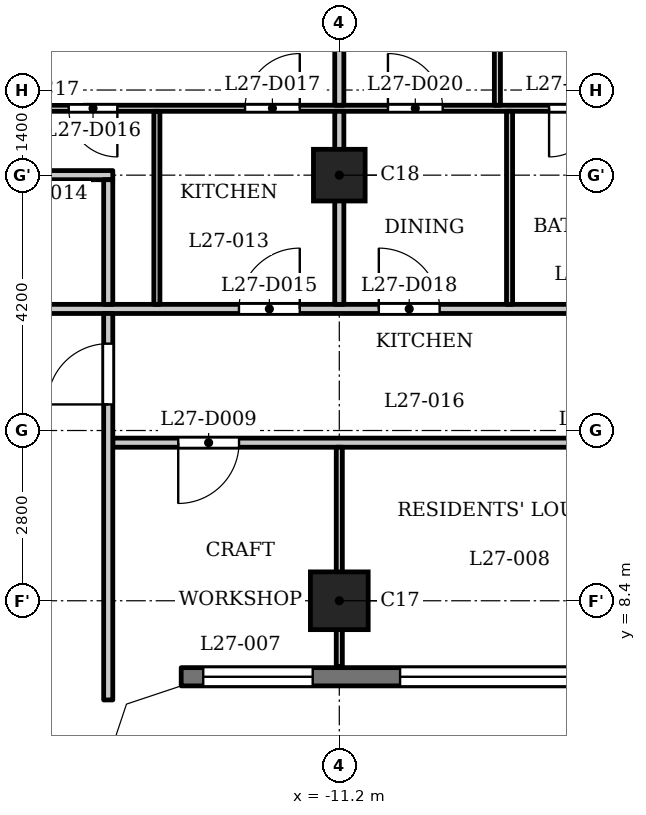
"""IFC4 building model, lengths in metres.
Left out: names, types, materials, properties, quantities, classifications, styles, units other than length and angle.
Written with IfcOpenShell. Run it as: python <this file> out.ifc"""

import sys

from ifc_helpers import new_model, si_unit, direction, frame, frame_2d, origin, origin_2d, place, context, subcontext, project, spatial, polyline, rectangle, outline, extrude, element, fill, save


model = new_model("IFC4")
c1 = context("Model", 3, precision=1e-05, world=origin(), true_north=direction((0.0, 1.0)))
c2 = subcontext(c1, "Body", "Model", "MODEL_VIEW")
j1 = project(units=[si_unit("LENGTHUNIT", "METRE"), si_unit("PLANEANGLEUNIT", "RADIAN")], contexts=[c1])
p1 = place(None, origin())
s1 = spatial("IfcSite", under=j1, at=p1, CompositionType="ELEMENT")
p2 = place(p1, origin())
s2 = spatial("IfcBuilding", under=s1, at=p2, CompositionType="ELEMENT")
p3 = place(p2, frame((0.0, 0.0, 107.8)))
s3 = spatial("IfcBuildingStorey", under=s2, at=p3, CompositionType="ELEMENT", Elevation=107.8)
p4 = place(p3, frame((-11.2, 8.4, 0.0), z_axis=(0.0, 0.0, 1.0), x_axis=(1.0, 0.0, 0.0)))
e1 = element("IfcColumn", 1, at=p4, inside=s3, PredefinedType="COLUMN", context=c2, shape_type="SweptSolid", body=[
    extrude(rectangle(XDim=0.95, YDim=0.95, at=origin_2d()), origin(), (0.0, 0.0, 1.0), 3.5),
])
p5 = place(p3, frame((-11.2, 15.4, 0.0), z_axis=(0.0, 0.0, 1.0), x_axis=(1.0, 0.0, 0.0)))
e2 = element("IfcColumn", 2, at=p5, inside=s3, PredefinedType="COLUMN", context=c2, shape_type="SweptSolid", body=[
    extrude(rectangle(XDim=0.85, YDim=0.85, at=origin_2d()), origin(), (0.0, 0.0, 1.0), 3.5),
])
p6 = place(p3, frame((-13.8, 7.15, 0.0), z_axis=(0.0, 0.0, 1.0), x_axis=(1.0, 0.0, 0.0)))
e3 = element("IfcWall", 3, at=p6, inside=s3, PredefinedType="SOLIDWALL", context=c2, shape_type="SweptSolid", body=[
    extrude(rectangle(XDim=27.6, YDim=0.3, at=frame_2d((13.8, 0.0))), origin(), (0.0, 0.0, 1.0), 3.2),
])
p7 = place(p6, frame((0.363, 0.0, 0.9)))
e4 = element("IfcOpeningElement", 4, at=p7, cuts=e3, PredefinedType="OPENING", context=c2, shape_type="SweptSolid", body=[
    extrude(rectangle(XDim=1.8, YDim=1.25, at=frame_2d((0.9, 0.625))), frame((0.0, 0.16, 0.0), z_axis=(0.0, -1.0, 0.0), x_axis=(1.0, 0.0, 0.0)), (0.0, 0.0, 1.0), 0.32),
])
p8 = place(p6, frame((3.6, 0.0, 1.2)))
e5 = element("IfcOpeningElement", 5, at=p8, cuts=e3, PredefinedType="OPENING", context=c2, shape_type="SweptSolid", body=[
    extrude(rectangle(XDim=3.6, YDim=0.95, at=frame_2d((1.8, 0.475))), frame((0.0, 0.16, 0.0), z_axis=(0.0, -1.0, 0.0), x_axis=(1.0, 0.0, 0.0)), (0.0, 0.0, 1.0), 0.32),
])
p9 = place(p6, frame((9.2, 0.0, 1.2)))
e6 = element("IfcOpeningElement", 6, at=p9, cuts=e3, PredefinedType="OPENING", context=c2, shape_type="SweptSolid", body=[
    extrude(rectangle(XDim=3.6, YDim=0.95, at=frame_2d((1.8, 0.475))), frame((0.0, 0.16, 0.0), z_axis=(0.0, -1.0, 0.0), x_axis=(1.0, 0.0, 0.0)), (0.0, 0.0, 1.0), 0.32),
])
p10 = place(p6, frame((14.8, 0.0, 1.2)))
e7 = element("IfcOpeningElement", 7, at=p10, cuts=e3, PredefinedType="OPENING", context=c2, shape_type="SweptSolid", body=[
    extrude(rectangle(XDim=3.6, YDim=0.95, at=frame_2d((1.8, 0.475))), frame((0.0, 0.16, 0.0), z_axis=(0.0, -1.0, 0.0), x_axis=(1.0, 0.0, 0.0)), (0.0, 0.0, 1.0), 0.32),
])
p11 = place(p6, frame((20.4, 0.0, 1.2)))
e8 = element("IfcOpeningElement", 8, at=p11, cuts=e3, PredefinedType="OPENING", context=c2, shape_type="SweptSolid", body=[
    extrude(rectangle(XDim=3.6, YDim=0.95, at=frame_2d((1.8, 0.475))), frame((0.0, 0.16, 0.0), z_axis=(0.0, -1.0, 0.0), x_axis=(1.0, 0.0, 0.0)), (0.0, 0.0, 1.0), 0.32),
])
p12 = place(p6, frame((25.438, 0.0, 0.9)))
e9 = element("IfcOpeningElement", 9, at=p12, cuts=e3, PredefinedType="OPENING", context=c2, shape_type="SweptSolid", body=[
    extrude(rectangle(XDim=1.8, YDim=1.25, at=frame_2d((0.9, 0.625))), frame((0.0, 0.16, 0.0), z_axis=(0.0, -1.0, 0.0), x_axis=(1.0, 0.0, 0.0)), (0.0, 0.0, 1.0), 0.32),
])
p13 = place(p3, frame((-14.925, 11.0, 0.0), z_axis=(0.0, 0.0, 1.0), x_axis=(1.0, 0.0, 0.0)))
e10 = element("IfcWall", 10, at=p13, inside=s3, PredefinedType="PARTITIONING", context=c2, shape_type="SweptSolid", body=[
    extrude(rectangle(XDim=29.85, YDim=0.15, at=frame_2d((14.925, 0.0))), origin(), (0.0, 0.0, 1.0), 3.2),
])
p14 = place(p13, frame((1.076, 0.0, 0.0)))
e11 = element("IfcOpeningElement", 11, at=p14, cuts=e10, PredefinedType="OPENING", context=c2, shape_type="SweptSolid", body=[
    extrude(rectangle(XDim=1.0, YDim=2.1, at=frame_2d((0.5, 1.05))), frame((0.0, 0.085, 0.0), z_axis=(0.0, -1.0, 0.0), x_axis=(1.0, 0.0, 0.0)), (0.0, 0.0, 1.0), 0.17),
])
p15 = place(p13, frame((7.625, 0.0, 0.0)))
e12 = element("IfcOpeningElement", 12, at=p15, cuts=e10, PredefinedType="OPENING", context=c2, shape_type="SweptSolid", body=[
    extrude(rectangle(XDim=1.0, YDim=2.1, at=frame_2d((0.5, 1.05))), frame((0.0, 0.085, 0.0), z_axis=(0.0, -1.0, 0.0), x_axis=(1.0, 0.0, 0.0)), (0.0, 0.0, 1.0), 0.17),
])
p16 = place(p13, frame((9.975, 0.0, 0.0)))
e13 = element("IfcOpeningElement", 13, at=p16, cuts=e10, PredefinedType="OPENING", context=c2, shape_type="SweptSolid", body=[
    extrude(rectangle(XDim=1.0, YDim=2.1, at=frame_2d((0.5, 1.05))), frame((0.0, 0.085, 0.0), z_axis=(0.0, -1.0, 0.0), x_axis=(1.0, 0.0, 0.0)), (0.0, 0.0, 1.0), 0.17),
])
p17 = place(p13, frame((18.825, 0.0, 0.0)))
e14 = element("IfcOpeningElement", 14, at=p17, cuts=e10, PredefinedType="OPENING", context=c2, shape_type="SweptSolid", body=[
    extrude(rectangle(XDim=1.0, YDim=2.1, at=frame_2d((0.5, 1.05))), frame((0.0, 0.085, 0.0), z_axis=(0.0, -1.0, 0.0), x_axis=(1.0, 0.0, 0.0)), (0.0, 0.0, 1.0), 0.17),
])
p18 = place(p13, frame((21.175, 0.0, 0.0)))
e15 = element("IfcOpeningElement", 15, at=p18, cuts=e10, PredefinedType="OPENING", context=c2, shape_type="SweptSolid", body=[
    extrude(rectangle(XDim=1.0, YDim=2.1, at=frame_2d((0.5, 1.05))), frame((0.0, 0.085, 0.0), z_axis=(0.0, -1.0, 0.0), x_axis=(1.0, 0.0, 0.0)), (0.0, 0.0, 1.0), 0.17),
])
p19 = place(p13, frame((27.775, 0.0, 0.0)))
e16 = element("IfcOpeningElement", 16, at=p19, cuts=e10, PredefinedType="OPENING", context=c2, shape_type="SweptSolid", body=[
    extrude(rectangle(XDim=1.0, YDim=2.1, at=frame_2d((0.5, 1.05))), frame((0.0, 0.085, 0.0), z_axis=(0.0, -1.0, 0.0), x_axis=(1.0, 0.0, 0.0)), (0.0, 0.0, 1.0), 0.17),
])
p20 = place(p3, frame((-17.4, 13.2, 0.0), z_axis=(0.0, 0.0, 1.0), x_axis=(1.0, 0.0, 0.0)))
e17 = element("IfcWall", 17, at=p20, inside=s3, PredefinedType="PARTITIONING", context=c2, shape_type="SweptSolid", body=[
    extrude(rectangle(XDim=34.8, YDim=0.15, at=frame_2d((17.4, 0.0))), origin(), (0.0, 0.0, 1.0), 3.2),
])
p21 = place(p20, frame((0.25, 0.0, 0.0)))
e18 = element("IfcOpeningElement", 18, at=p21, cuts=e17, PredefinedType="OPENING", context=c2, shape_type="SweptSolid", body=[
    extrude(rectangle(XDim=1.0, YDim=2.1, at=frame_2d((0.5, 1.05))), frame((0.0, 0.085, 0.0), z_axis=(0.0, -1.0, 0.0), x_axis=(1.0, 0.0, 0.0)), (0.0, 0.0, 1.0), 0.17),
])
p22 = place(p20, frame((33.65, 0.0, 0.0)))
e19 = element("IfcOpeningElement", 19, at=p22, cuts=e17, PredefinedType="OPENING", context=c2, shape_type="SweptSolid", body=[
    extrude(rectangle(XDim=1.0, YDim=2.1, at=frame_2d((0.5, 1.05))), frame((0.0, 0.085, 0.0), z_axis=(0.0, -1.0, 0.0), x_axis=(1.0, 0.0, 0.0)), (0.0, 0.0, 1.0), 0.17),
])
p23 = place(p20, frame((4.55, 0.0, 0.0)))
e20 = element("IfcOpeningElement", 20, at=p23, cuts=e17, PredefinedType="OPENING", context=c2, shape_type="SweptSolid", body=[
    extrude(rectangle(XDim=1.0, YDim=2.1, at=frame_2d((0.5, 1.05))), frame((0.0, 0.085, 0.0), z_axis=(0.0, -1.0, 0.0), x_axis=(1.0, 0.0, 0.0)), (0.0, 0.0, 1.0), 0.17),
])
p24 = place(p20, frame((6.85, 0.0, 0.0)))
e21 = element("IfcOpeningElement", 21, at=p24, cuts=e17, PredefinedType="OPENING", context=c2, shape_type="SweptSolid", body=[
    extrude(rectangle(XDim=1.0, YDim=2.1, at=frame_2d((0.5, 1.05))), frame((0.0, 0.085, 0.0), z_axis=(0.0, -1.0, 0.0), x_axis=(1.0, 0.0, 0.0)), (0.0, 0.0, 1.0), 0.17),
])
p25 = place(p20, frame((12.5, 0.0, 0.0)))
e22 = element("IfcOpeningElement", 22, at=p25, cuts=e17, PredefinedType="OPENING", context=c2, shape_type="SweptSolid", body=[
    extrude(rectangle(XDim=1.0, YDim=2.1, at=frame_2d((0.5, 1.05))), frame((0.0, 0.085, 0.0), z_axis=(0.0, -1.0, 0.0), x_axis=(1.0, 0.0, 0.0)), (0.0, 0.0, 1.0), 0.17),
])
p26 = place(p20, frame((25.7, 0.0, 0.0)))
e23 = element("IfcOpeningElement", 23, at=p26, cuts=e17, PredefinedType="OPENING", context=c2, shape_type="SweptSolid", body=[
    extrude(rectangle(XDim=1.0, YDim=2.1, at=frame_2d((0.5, 1.05))), frame((0.0, 0.085, 0.0), z_axis=(0.0, -1.0, 0.0), x_axis=(1.0, 0.0, 0.0)), (0.0, 0.0, 1.0), 0.17),
])
p27 = place(p20, frame((29.75, 0.0, 0.0)))
e24 = element("IfcOpeningElement", 24, at=p27, cuts=e17, PredefinedType="OPENING", context=c2, shape_type="SweptSolid", body=[
    extrude(rectangle(XDim=1.0, YDim=2.1, at=frame_2d((0.5, 1.05))), frame((0.0, 0.085, 0.0), z_axis=(0.0, -1.0, 0.0), x_axis=(1.0, 0.0, 0.0)), (0.0, 0.0, 1.0), 0.17),
])
p28 = place(p3, frame((-27.484, 15.4, 0.0), z_axis=(0.0, 0.0, 1.0), x_axis=(1.0, 0.0, 0.0)))
e25 = element("IfcWall", 25, at=p28, inside=s3, PredefinedType="PARTITIONING", context=c2, shape_type="SweptSolid", body=[
    extrude(rectangle(XDim=12.559, YDim=0.15, at=frame_2d((6.279, 0.0))), origin(), (0.0, 0.0, 1.0), 3.2),
])
p29 = place(p28, frame((9.034, 0.0, 0.0)))
e26 = element("IfcOpeningElement", 26, at=p29, cuts=e25, PredefinedType="OPENING", context=c2, shape_type="SweptSolid", body=[
    extrude(rectangle(XDim=1.0, YDim=2.1, at=frame_2d((0.5, 1.05))), frame((0.0, 0.085, 0.0), z_axis=(0.0, -1.0, 0.0), x_axis=(1.0, 0.0, 0.0)), (0.0, 0.0, 1.0), 0.17),
])
p30 = place(p3, frame((-16.725, 16.5, 0.0), z_axis=(0.0, 0.0, 1.0), x_axis=(1.0, 0.0, 0.0)))
e27 = element("IfcWall", 27, at=p30, inside=s3, PredefinedType="PARTITIONING", context=c2, shape_type="SweptSolid", body=[
    extrude(rectangle(XDim=33.45, YDim=0.1, at=frame_2d((16.725, 0.0))), origin(), (0.0, 0.0, 1.0), 3.2),
])
p31 = place(p30, frame((1.075, 0.0, 0.0)))
e28 = element("IfcOpeningElement", 28, at=p31, cuts=e27, PredefinedType="OPENING", context=c2, shape_type="SweptSolid", body=[
    extrude(rectangle(XDim=0.8, YDim=2.1, at=frame_2d((0.4, 1.05))), frame((0.0, 0.06, 0.0), z_axis=(0.0, -1.0, 0.0), x_axis=(1.0, 0.0, 0.0)), (0.0, 0.0, 1.0), 0.12),
])
p32 = place(p30, frame((3.975, 0.0, 0.0)))
e29 = element("IfcOpeningElement", 29, at=p32, cuts=e27, PredefinedType="OPENING", context=c2, shape_type="SweptSolid", body=[
    extrude(rectangle(XDim=0.9, YDim=2.1, at=frame_2d((0.45, 1.05))), frame((0.0, 0.06, 0.0), z_axis=(0.0, -1.0, 0.0), x_axis=(1.0, 0.0, 0.0)), (0.0, 0.0, 1.0), 0.12),
])
p33 = place(p30, frame((8.975, 0.0, 0.0)))
e30 = element("IfcOpeningElement", 30, at=p33, cuts=e27, PredefinedType="OPENING", context=c2, shape_type="SweptSolid", body=[
    extrude(rectangle(XDim=0.8, YDim=2.1, at=frame_2d((0.4, 1.05))), frame((0.0, 0.06, 0.0), z_axis=(0.0, -1.0, 0.0), x_axis=(1.0, 0.0, 0.0)), (0.0, 0.0, 1.0), 0.12),
])
p34 = place(p30, frame((6.325, 0.0, 0.0)))
e31 = element("IfcOpeningElement", 31, at=p34, cuts=e27, PredefinedType="OPENING", context=c2, shape_type="SweptSolid", body=[
    extrude(rectangle(XDim=0.9, YDim=2.1, at=frame_2d((0.45, 1.05))), frame((0.0, 0.06, 0.0), z_axis=(0.0, -1.0, 0.0), x_axis=(1.0, 0.0, 0.0)), (0.0, 0.0, 1.0), 0.12),
])
p35 = place(p30, frame((20.725, 0.0, 0.0)))
e32 = element("IfcOpeningElement", 32, at=p35, cuts=e27, PredefinedType="OPENING", context=c2, shape_type="SweptSolid", body=[
    extrude(rectangle(XDim=0.8, YDim=2.1, at=frame_2d((0.4, 1.05))), frame((0.0, 0.06, 0.0), z_axis=(0.0, -1.0, 0.0), x_axis=(1.0, 0.0, 0.0)), (0.0, 0.0, 1.0), 0.12),
])
p36 = place(p30, frame((17.775, 0.0, 0.0)))
e33 = element("IfcOpeningElement", 33, at=p36, cuts=e27, PredefinedType="OPENING", context=c2, shape_type="SweptSolid", body=[
    extrude(rectangle(XDim=0.9, YDim=2.1, at=frame_2d((0.45, 1.05))), frame((0.0, 0.06, 0.0), z_axis=(0.0, -1.0, 0.0), x_axis=(1.0, 0.0, 0.0)), (0.0, 0.0, 1.0), 0.12),
])
p37 = place(p30, frame((11.825, 0.0, 0.0)))
e34 = element("IfcOpeningElement", 34, at=p37, cuts=e27, PredefinedType="OPENING", context=c2, shape_type="SweptSolid", body=[
    extrude(rectangle(XDim=0.9, YDim=2.1, at=frame_2d((0.45, 1.05))), frame((0.0, 0.06, 0.0), z_axis=(0.0, -1.0, 0.0), x_axis=(1.0, 0.0, 0.0)), (0.0, 0.0, 1.0), 0.12),
])
p38 = place(p30, frame((15.175, 0.0, 0.0)))
e35 = element("IfcOpeningElement", 35, at=p38, cuts=e27, PredefinedType="OPENING", context=c2, shape_type="SweptSolid", body=[
    extrude(rectangle(XDim=0.9, YDim=2.1, at=frame_2d((0.45, 1.05))), frame((0.0, 0.06, 0.0), z_axis=(0.0, -1.0, 0.0), x_axis=(1.0, 0.0, 0.0)), (0.0, 0.0, 1.0), 0.12),
])
p39 = place(p30, frame((22.975, 0.0, 0.0)))
e36 = element("IfcOpeningElement", 36, at=p39, cuts=e27, PredefinedType="OPENING", context=c2, shape_type="SweptSolid", body=[
    extrude(rectangle(XDim=0.8, YDim=2.1, at=frame_2d((0.4, 1.05))), frame((0.0, 0.06, 0.0), z_axis=(0.0, -1.0, 0.0), x_axis=(1.0, 0.0, 0.0)), (0.0, 0.0, 1.0), 0.12),
])
p40 = place(p30, frame((24.875, 0.0, 0.0)))
e37 = element("IfcOpeningElement", 37, at=p40, cuts=e27, PredefinedType="OPENING", context=c2, shape_type="SweptSolid", body=[
    extrude(rectangle(XDim=0.9, YDim=2.1, at=frame_2d((0.45, 1.05))), frame((0.0, 0.06, 0.0), z_axis=(0.0, -1.0, 0.0), x_axis=(1.0, 0.0, 0.0)), (0.0, 0.0, 1.0), 0.12),
])
p41 = place(p30, frame((32.075, 0.0, 0.0)))
e38 = element("IfcOpeningElement", 38, at=p41, cuts=e27, PredefinedType="OPENING", context=c2, shape_type="SweptSolid", body=[
    extrude(rectangle(XDim=0.8, YDim=2.1, at=frame_2d((0.4, 1.05))), frame((0.0, 0.06, 0.0), z_axis=(0.0, -1.0, 0.0), x_axis=(1.0, 0.0, 0.0)), (0.0, 0.0, 1.0), 0.12),
])
p42 = place(p30, frame((29.175, 0.0, 0.0)))
e39 = element("IfcOpeningElement", 39, at=p42, cuts=e27, PredefinedType="OPENING", context=c2, shape_type="SweptSolid", body=[
    extrude(rectangle(XDim=0.9, YDim=2.1, at=frame_2d((0.45, 1.05))), frame((0.0, 0.06, 0.0), z_axis=(0.0, -1.0, 0.0), x_axis=(1.0, 0.0, 0.0)), (0.0, 0.0, 1.0), 0.12),
])
p43 = place(p3, frame((-15.0, 6.769, 0.0), z_axis=(0.0, 0.0, 1.0), x_axis=(0.0, 1.0, 0.0)))
e40 = element("IfcWall", 40, at=p43, inside=s3, PredefinedType="PARTITIONING", context=c2, shape_type="SweptSolid", body=[
    extrude(rectangle(XDim=6.356, YDim=0.15, at=frame_2d((3.178, 0.0))), origin(), (0.0, 0.0, 1.0), 3.2),
])
p44 = place(p43, frame((4.86, 0.0, 0.0)))
e41 = element("IfcOpeningElement", 41, at=p44, cuts=e40, PredefinedType="OPENING", context=c2, shape_type="SweptSolid", body=[
    extrude(rectangle(XDim=1.0, YDim=2.1, at=frame_2d((0.5, 1.05))), frame((0.0, 0.085, 0.0), z_axis=(0.0, -1.0, 0.0), x_axis=(1.0, 0.0, 0.0)), (0.0, 0.0, 1.0), 0.17),
])
p45 = place(p3, frame((-15.0, 13.275, 0.0), z_axis=(0.0, 0.0, 1.0), x_axis=(0.0, 1.0, 0.0)))
e42 = element("IfcWall", 42, at=p45, inside=s3, PredefinedType="PARTITIONING", context=c2, shape_type="SweptSolid", body=[
    extrude(rectangle(XDim=2.05, YDim=0.15, at=frame_2d((1.025, 0.0))), origin(), (0.0, 0.0, 1.0), 3.2),
])
p46 = place(p3, frame((-14.2, 13.275, 0.0), z_axis=(0.0, 0.0, 1.0), x_axis=(0.0, 1.0, 0.0)))
e43 = element("IfcWall", 43, at=p46, inside=s3, PredefinedType="PARTITIONING", context=c2, shape_type="SweptSolid", body=[
    extrude(rectangle(XDim=3.175, YDim=0.1, at=frame_2d((1.587, 0.0))), origin(), (0.0, 0.0, 1.0), 3.2),
])
p47 = place(p3, frame((-11.2, 7.32, 0.0), z_axis=(0.0, 0.0, 1.0), x_axis=(0.0, 1.0, 0.0)))
e44 = element("IfcWall", 44, at=p47, inside=s3, PredefinedType="PARTITIONING", context=c2, shape_type="SweptSolid", body=[
    extrude(rectangle(XDim=3.605, YDim=0.1, at=frame_2d((1.802, 0.0))), origin(), (0.0, 0.0, 1.0), 3.2),
])
p48 = place(p3, frame((-11.2, 13.275, 0.0), z_axis=(0.0, 0.0, 1.0), x_axis=(0.0, 1.0, 0.0)))
e45 = element("IfcWall", 45, at=p48, inside=s3, PredefinedType="PARTITIONING", context=c2, shape_type="SweptSolid", body=[
    extrude(rectangle(XDim=3.175, YDim=0.15, at=frame_2d((1.587, 0.0))), origin(), (0.0, 0.0, 1.0), 3.2),
])
p49 = place(p3, frame((-11.2, 16.55, 0.0), z_axis=(0.0, 0.0, 1.0), x_axis=(0.0, 1.0, 0.0)))
e46 = element("IfcWall", 46, at=p49, inside=s3, PredefinedType="PARTITIONING", context=c2, shape_type="SweptSolid", body=[
    extrude(rectangle(XDim=6.43, YDim=0.15, at=frame_2d((3.215, 0.0))), origin(), (0.0, 0.0, 1.0), 3.2),
])
p50 = place(p3, frame((-8.6, 16.55, 0.0), z_axis=(0.0, 0.0, 1.0), x_axis=(0.0, 1.0, 0.0)))
e47 = element("IfcWall", 47, at=p50, inside=s3, PredefinedType="PARTITIONING", context=c2, shape_type="SweptSolid", body=[
    extrude(rectangle(XDim=5.53, YDim=0.1, at=frame_2d((2.765, 0.0))), origin(), (0.0, 0.0, 1.0), 3.2),
])
p51 = place(p50, frame((1.35, 0.0, 0.0)))
e48 = element("IfcOpeningElement", 48, at=p51, cuts=e47, PredefinedType="OPENING", context=c2, shape_type="SweptSolid", body=[
    extrude(rectangle(XDim=0.9, YDim=2.1, at=frame_2d((0.45, 1.05))), frame((0.0, 0.06, 0.0), z_axis=(0.0, -1.0, 0.0), x_axis=(1.0, 0.0, 0.0)), (0.0, 0.0, 1.0), 0.12),
])
p52 = place(p3, frame((-8.4, 13.275, 0.0), z_axis=(0.0, 0.0, 1.0), x_axis=(0.0, 1.0, 0.0)))
e49 = element("IfcWall", 49, at=p52, inside=s3, PredefinedType="PARTITIONING", context=c2, shape_type="SweptSolid", body=[
    extrude(rectangle(XDim=3.175, YDim=0.1, at=frame_2d((1.587, 0.0))), origin(), (0.0, 0.0, 1.0), 3.2),
])
p53 = place(p3, origin())
e50 = element("IfcWall", 50, at=p53, inside=s3, PredefinedType="SOLIDWALL", context=c2, shape_type="SweptSolid", body=[
    extrude(outline(polyline([(-13.849, 7.3), (-14.937, 6.937), (-15.3, 5.849), (-15.3, 5.8), (-15.0, 5.8), (-14.7, 6.7), (-13.8, 7.0), (-13.8, 7.3), (-13.849, 7.3)])), origin(), (0.0, 0.0, 1.0), 3.2),
])
p54 = place(p44, origin())
e51 = element("IfcDoor", 51, at=p54, inside=s3, OperationType="SINGLE_SWING_RIGHT", PredefinedType="DOOR", context=c2, shape_type="SweptSolid", body=[
    extrude(rectangle(XDim=1.0, YDim=2.1, at=frame_2d((0.5, 1.05))), frame((0.0, 0.025, 0.0), z_axis=(0.0, -1.0, 0.0), x_axis=(1.0, 0.0, 0.0)), (0.0, 0.0, 1.0), 0.05),
])
fill(e41, e51)
p55 = place(p14, origin())
e52 = element("IfcDoor", 52, at=p55, inside=s3, OperationType="SINGLE_SWING_LEFT", PredefinedType="DOOR", context=c2, shape_type="SweptSolid", body=[
    extrude(rectangle(XDim=1.0, YDim=2.1, at=frame_2d((0.5, 1.05))), frame((0.0, 0.025, 0.0), z_axis=(0.0, -1.0, 0.0), x_axis=(1.0, 0.0, 0.0)), (0.0, 0.0, 1.0), 0.05),
])
fill(e11, e52)
p56 = place(p23, origin())
e53 = element("IfcDoor", 53, at=p56, inside=s3, OperationType="SINGLE_SWING_LEFT", PredefinedType="DOOR", context=c2, shape_type="SweptSolid", body=[
    extrude(rectangle(XDim=1.0, YDim=2.1, at=frame_2d((0.5, 1.05))), frame((0.0, 0.025, 0.0), z_axis=(0.0, -1.0, 0.0), x_axis=(1.0, 0.0, 0.0)), (0.0, 0.0, 1.0), 0.05),
])
fill(e20, e53)
p57 = place(p31, origin())
e54 = element("IfcDoor", 54, at=p57, inside=s3, OperationType="SINGLE_SWING_RIGHT", PredefinedType="DOOR", context=c2, shape_type="SweptSolid", body=[
    extrude(rectangle(XDim=0.8, YDim=2.1, at=frame_2d((0.4, 1.05))), frame((0.0, 0.025, 0.0), z_axis=(0.0, -1.0, 0.0), x_axis=(1.0, 0.0, 0.0)), (0.0, 0.0, 1.0), 0.05),
])
fill(e28, e54)
p58 = place(p32, origin())
e55 = element("IfcDoor", 55, at=p58, inside=s3, OperationType="SINGLE_SWING_LEFT", PredefinedType="DOOR", context=c2, shape_type="SweptSolid", body=[
    extrude(rectangle(XDim=0.9, YDim=2.1, at=frame_2d((0.45, 1.05))), frame((0.0, 0.025, 0.0), z_axis=(0.0, -1.0, 0.0), x_axis=(1.0, 0.0, 0.0)), (0.0, 0.0, 1.0), 0.05),
])
fill(e29, e55)
p59 = place(p24, origin())
e56 = element("IfcDoor", 56, at=p59, inside=s3, OperationType="SINGLE_SWING_RIGHT", PredefinedType="DOOR", context=c2, shape_type="SweptSolid", body=[
    extrude(rectangle(XDim=1.0, YDim=2.1, at=frame_2d((0.5, 1.05))), frame((0.0, 0.025, 0.0), z_axis=(0.0, -1.0, 0.0), x_axis=(1.0, 0.0, 0.0)), (0.0, 0.0, 1.0), 0.05),
])
fill(e21, e56)
p60 = place(p33, origin())
e57 = element("IfcDoor", 57, at=p60, inside=s3, OperationType="SINGLE_SWING_LEFT", PredefinedType="DOOR", context=c2, shape_type="SweptSolid", body=[
    extrude(rectangle(XDim=0.8, YDim=2.1, at=frame_2d((0.4, 1.05))), frame((0.0, 0.025, 0.0), z_axis=(0.0, -1.0, 0.0), x_axis=(1.0, 0.0, 0.0)), (0.0, 0.0, 1.0), 0.05),
])
fill(e30, e57)
p61 = place(p34, origin())
e58 = element("IfcDoor", 58, at=p61, inside=s3, OperationType="SINGLE_SWING_RIGHT", PredefinedType="DOOR", context=c2, shape_type="SweptSolid", body=[
    extrude(rectangle(XDim=0.9, YDim=2.1, at=frame_2d((0.45, 1.05))), frame((0.0, 0.025, 0.0), z_axis=(0.0, -1.0, 0.0), x_axis=(1.0, 0.0, 0.0)), (0.0, 0.0, 1.0), 0.05),
])
fill(e31, e58)
p62 = place(p7, origin())
e59 = element("IfcWindow", 59, at=p62, inside=s3, PartitioningType="SINGLE_PANEL", PredefinedType="WINDOW", context=c2, shape_type="SweptSolid", body=[
    extrude(rectangle(XDim=1.8, YDim=1.25, at=frame_2d((0.9, 0.625))), frame((0.0, 0.03, 0.0), z_axis=(0.0, -1.0, 0.0), x_axis=(1.0, 0.0, 0.0)), (0.0, 0.0, 1.0), 0.06),
])
fill(e4, e59)
p63 = place(p8, origin())
e60 = element("IfcWindow", 60, at=p63, inside=s3, PartitioningType="SINGLE_PANEL", PredefinedType="WINDOW", context=c2, shape_type="SweptSolid", body=[
    extrude(rectangle(XDim=3.6, YDim=0.95, at=frame_2d((1.8, 0.475))), frame((0.0, 0.03, 0.0), z_axis=(0.0, -1.0, 0.0), x_axis=(1.0, 0.0, 0.0)), (0.0, 0.0, 1.0), 0.06),
])
fill(e5, e60)
save(model, sys.argv[1])
